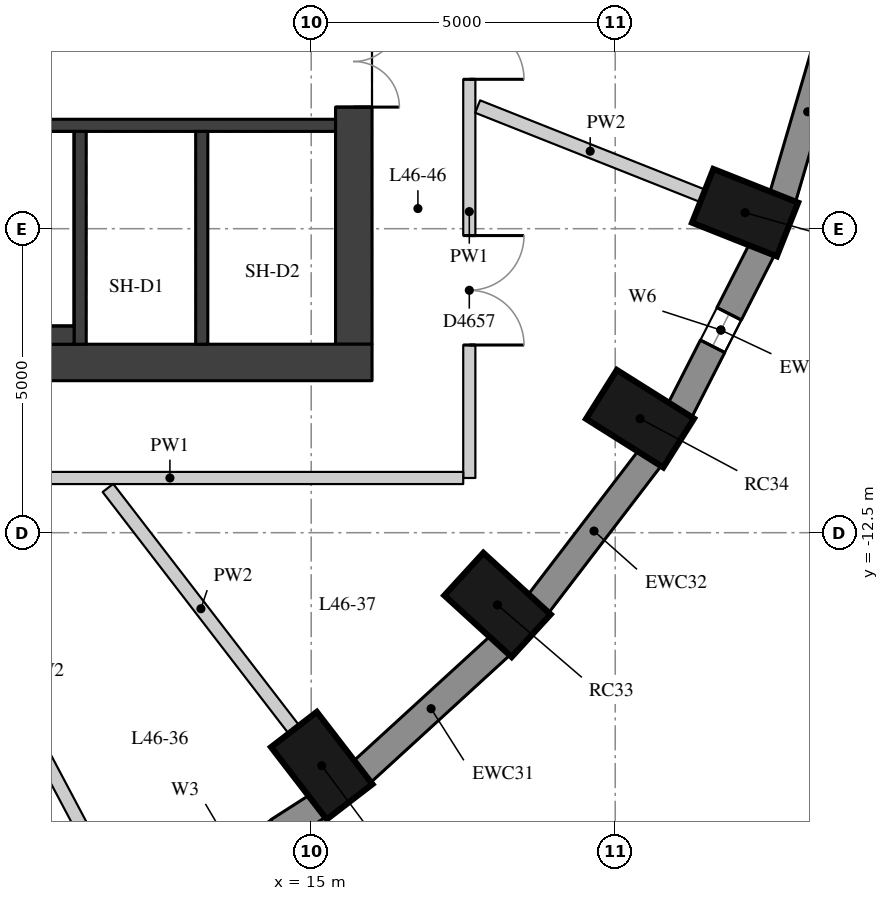
"""IFC4 building model, lengths in metres.
Left out: names, types, materials, properties, quantities, classifications, styles, units other than length and angle.
Written with IfcOpenShell. Run it as: python <this file> out.ifc"""

import sys

from ifc_helpers import new_model, si_unit, direction, frame, frame_2d, origin, origin_2d, place, context, subcontext, project, spatial, rectangle, extrude, element, fill, save


model = new_model("IFC4")
c1 = context("Model", 3, precision=1e-05, world=origin(), true_north=direction((0.0, 1.0)))
c2 = subcontext(c1, "Body", "Model", "MODEL_VIEW")
j1 = project(units=[si_unit("LENGTHUNIT", "METRE"), si_unit("PLANEANGLEUNIT", "RADIAN")], contexts=[c1])
p1 = place(None, origin())
s1 = spatial("IfcSite", under=j1, at=p1, CompositionType="ELEMENT")
p2 = place(p1, origin())
s2 = spatial("IfcBuilding", under=s1, at=p2, CompositionType="ELEMENT")
p3 = place(p2, frame((0.0, 0.0, 164.9)))
s3 = spatial("IfcBuildingStorey", under=s2, at=p3, CompositionType="ELEMENT", Elevation=164.9)
for number, where, z_axis, x_axis in (
    (1, (15.173, -16.332, 0.0), (0.0, 0.0, 1.0), (0.61, -0.792, 0.0)),
    (2, (18.064, -13.688, 0.0), (0.0, 0.0, 1.0), (0.738, -0.675, 0.0)),
    (3, (20.408, -10.625, 0.0), (0.0, 0.0, 1.0), (0.846, -0.533, 0.0)),
    (4, (22.136, -7.236, 0.0), (0.0, 0.0, 1.0), (0.93, -0.369, 0.0)),
):
    element("IfcColumn", number, at=place(p3, frame(where, z_axis=z_axis, x_axis=x_axis)), inside=s3, PredefinedType="COLUMN", context=c2, shape_type="SweptSolid", body=[
        extrude(rectangle(XDim=1.5, YDim=0.95, at=origin_2d()), origin(), (0.0, 0.0, 1.0), 3.3),
    ])
p4 = place(p3, frame((12.455, -18.693, 0.0), z_axis=(0.0, 0.0, 1.0), x_axis=(0.842065914439, 0.539374633943, 0.0)))
e5 = element("IfcWall", 5, at=p4, inside=s3, PredefinedType="SOLIDWALL", context=c2, shape_type="SweptSolid", body=[
    extrude(rectangle(XDim=3.151, YDim=0.45, at=frame_2d((1.576, 0.0))), origin(), (0.0, 0.0, 1.0), 3.02),
])
p5 = place(p4, frame((0.776, 0.0, 0.4)))
e6 = element("IfcOpeningElement", 6, at=p5, cuts=e5, PredefinedType="OPENING", context=c2, shape_type="SweptSolid", body=[
    extrude(rectangle(XDim=1.6, YDim=1.75, at=frame_2d((0.8, 0.875))), frame((0.0, 0.235, 0.0), z_axis=(0.0, -1.0, 0.0), x_axis=(1.0, 0.0, 0.0)), (0.0, 0.0, 1.0), 0.47),
])
p6 = place(p3, frame((15.83, -16.439, 0.0), z_axis=(0.0, 0.0, 1.0), x_axis=(0.737808755941, 0.675009807082, 0.0)))
e7 = element("IfcWall", 7, at=p6, inside=s3, PredefinedType="SOLIDWALL", context=c2, shape_type="SweptSolid", body=[
    extrude(rectangle(XDim=3.094, YDim=0.45, at=frame_2d((1.547, 0.0))), origin(), (0.0, 0.0, 1.0), 3.02),
])
p7 = place(p3, frame((18.728, -13.679, 0.0), z_axis=(0.0, 0.0, 1.0), x_axis=(0.607817056371, 0.794077090706, 0.0)))
e8 = element("IfcWall", 8, at=p7, inside=s3, PredefinedType="SOLIDWALL", context=c2, shape_type="SweptSolid", body=[
    extrude(rectangle(XDim=3.037, YDim=0.45, at=frame_2d((1.519, 0.0))), origin(), (0.0, 0.0, 1.0), 3.02),
])
p8 = place(p3, frame((21.059, -10.497, 0.0), z_axis=(0.0, 0.0, 1.0), x_axis=(0.454133999889, 0.890933392653, 0.0)))
e9 = element("IfcWall", 9, at=p8, inside=s3, PredefinedType="SOLIDWALL", context=c2, shape_type="SweptSolid", body=[
    extrude(rectangle(XDim=2.986, YDim=0.45, at=frame_2d((1.493, 0.0))), origin(), (0.0, 0.0, 1.0), 3.02),
])
p9 = place(p8, frame((1.193, 0.0, 0.4)))
e10 = element("IfcOpeningElement", 10, at=p9, cuts=e9, PredefinedType="OPENING", context=c2, shape_type="SweptSolid", body=[
    extrude(rectangle(XDim=0.6, YDim=1.75, at=frame_2d((0.3, 0.875))), frame((0.0, 0.235, 0.0), z_axis=(0.0, -1.0, 0.0), x_axis=(1.0, 0.0, 0.0)), (0.0, 0.0, 1.0), 0.47),
])
p10 = place(p3, frame((22.751, -6.991, 0.0), z_axis=(0.0, 0.0, 1.0), x_axis=(0.281049481624, 0.959693278542, 0.0)))
e11 = element("IfcWall", 11, at=p10, inside=s3, PredefinedType="SOLIDWALL", context=c2, shape_type="SweptSolid", body=[
    extrude(rectangle(XDim=2.948, YDim=0.45, at=frame_2d((1.474, 0.0))), origin(), (0.0, 0.0, 1.0), 3.02),
])
p11 = place(p3, frame((15.7, -9.4, 0.0), z_axis=(0.0, 0.0, 1.0), x_axis=(0.0, 1.0, 0.0)))
e12 = element("IfcWall", 12, at=p11, inside=s3, PredefinedType="SHEAR", context=c2, shape_type="SweptSolid", body=[
    extrude(rectangle(XDim=18.8, YDim=0.6, at=frame_2d((9.4, 0.0))), origin(), (0.0, 0.0, 1.0), 3.02),
])
p12 = place(p11, frame((13.4, 0.0, 0.0)))
e13 = element("IfcOpeningElement", 13, at=p12, cuts=e12, PredefinedType="OPENING", context=c2, shape_type="SweptSolid", body=[
    extrude(rectangle(XDim=1.5, YDim=2.1, at=frame_2d((0.75, 1.05))), frame((0.0, 0.31, 0.0), z_axis=(0.0, -1.0, 0.0), x_axis=(1.0, 0.0, 0.0)), (0.0, 0.0, 1.0), 0.62),
])
p13 = place(p11, frame((3.9, 0.0, 0.0)))
e14 = element("IfcOpeningElement", 14, at=p13, cuts=e12, PredefinedType="OPENING", context=c2, shape_type="SweptSolid", body=[
    extrude(rectangle(XDim=1.5, YDim=2.1, at=frame_2d((0.75, 1.05))), frame((0.0, 0.31, 0.0), z_axis=(0.0, -1.0, 0.0), x_axis=(1.0, 0.0, 0.0)), (0.0, 0.0, 1.0), 0.62),
])
p14 = place(p3, frame((4.0, -9.7, 0.0), z_axis=(0.0, 0.0, 1.0), x_axis=(1.0, 0.0, 0.0)))
e15 = element("IfcWall", 15, at=p14, inside=s3, PredefinedType="SHEAR", context=c2, shape_type="SweptSolid", body=[
    extrude(rectangle(XDim=12.0, YDim=0.6, at=frame_2d((6.0, 0.0))), origin(), (0.0, 0.0, 1.0), 3.02),
])
p15 = place(p3, frame((4.6, -5.8, 0.0), z_axis=(0.0, 0.0, 1.0), x_axis=(1.0, 0.0, 0.0)))
e16 = element("IfcWall", 16, at=p15, inside=s3, PredefinedType="SHEAR", context=c2, shape_type="SweptSolid", body=[
    extrude(rectangle(XDim=10.8, YDim=0.2, at=frame_2d((5.4, 0.0))), origin(), (0.0, 0.0, 1.0), 3.02),
])
for number, where, z_axis, x_axis in (
    (17, (11.2, -9.4, 0.0), (0.0, 0.0, 1.0), (0.0, 1.0, 0.0)),
    (18, (13.2, -9.4, 0.0), (0.0, 0.0, 1.0), (0.0, 1.0, 0.0)),
):
    element("IfcWall", number, at=place(p3, frame(where, z_axis=z_axis, x_axis=x_axis)), inside=s3, PredefinedType="SHEAR", context=c2, shape_type="SweptSolid", body=[
        extrude(rectangle(XDim=3.5, YDim=0.2, at=frame_2d((1.75, 0.0))), origin(), (0.0, 0.0, 1.0), 3.02),
    ])
p16 = place(p3, frame((6.22, -9.25, 0.0), z_axis=(0.0, 0.0, 1.0), x_axis=(1.0, 0.0, 0.0)))
e19 = element("IfcWall", 19, at=p16, inside=s3, PredefinedType="PARTITIONING", context=c2, shape_type="SweptSolid", body=[
    extrude(rectangle(XDim=4.88, YDim=0.3, at=frame_2d((2.44, 0.0))), origin(), (0.0, 0.0, 1.0), 3.02),
])
p17 = place(p3, frame((17.6, -2.838, 0.0), z_axis=(0.0, 0.0, 1.0), x_axis=(0.0, -1.0, 0.0)))
e20 = element("IfcWall", 20, at=p17, inside=s3, PredefinedType="PARTITIONING", context=c2, shape_type="SweptSolid", body=[
    extrude(rectangle(XDim=8.762, YDim=0.2, at=frame_2d((4.381, 0.0))), origin(), (0.0, 0.0, 1.0), 3.02),
])
p18 = place(p17, frame((4.775, 0.0, 0.0)))
e21 = element("IfcOpeningElement", 21, at=p18, cuts=e20, PredefinedType="OPENING", context=c2, shape_type="SweptSolid", body=[
    extrude(rectangle(XDim=1.8, YDim=2.1, at=frame_2d((0.9, 1.05))), frame((0.0, 0.11, 0.0), z_axis=(0.0, -1.0, 0.0), x_axis=(1.0, 0.0, 0.0)), (0.0, 0.0, 1.0), 0.22),
])
p19 = place(p17, frame((0.405, 0.0, 0.0)))
e22 = element("IfcOpeningElement", 22, at=p19, cuts=e20, PredefinedType="OPENING", context=c2, shape_type="SweptSolid", body=[
    extrude(rectangle(XDim=1.8, YDim=2.1, at=frame_2d((0.9, 1.05))), frame((0.0, 0.11, 0.0), z_axis=(0.0, -1.0, 0.0), x_axis=(1.0, 0.0, 0.0)), (0.0, 0.0, 1.0), 0.22),
])
p20 = place(p3, frame((17.5, -11.6, 0.0), z_axis=(0.0, 0.0, 1.0), x_axis=(-1.0, 0.0, 0.0)))
e23 = element("IfcWall", 23, at=p20, inside=s3, PredefinedType="PARTITIONING", context=c2, shape_type="SweptSolid", body=[
    extrude(rectangle(XDim=9.647, YDim=0.2, at=frame_2d((4.823, 0.0))), origin(), (0.0, 0.0, 1.0), 3.02),
])
p21 = place(p20, frame((7.192, 0.0, 0.0)))
e24 = element("IfcOpeningElement", 24, at=p21, cuts=e23, PredefinedType="OPENING", context=c2, shape_type="SweptSolid", body=[
    extrude(rectangle(XDim=0.9, YDim=2.1, at=frame_2d((0.45, 1.05))), frame((0.0, 0.11, 0.0), z_axis=(0.0, -1.0, 0.0), x_axis=(1.0, 0.0, 0.0)), (0.0, 0.0, 1.0), 0.22),
])
p22 = place(p3, frame((11.474, -17.813, 0.0), z_axis=(0.0, 0.0, 1.0), x_axis=(-0.468051273849, 0.88370130986, 0.0)))
e25 = element("IfcWall", 25, at=p22, inside=s3, PredefinedType="PARTITIONING", context=c2, shape_type="SweptSolid", body=[
    extrude(rectangle(XDim=6.858, YDim=0.22, at=frame_2d((3.429, 0.0))), origin(), (0.0, 0.0, 1.0), 3.02),
])
p23 = place(p3, frame((14.716, -15.737, 0.0), z_axis=(0.0, 0.0, 1.0), x_axis=(-0.609986007715, 0.792412184657, 0.0)))
e26 = element("IfcWall", 26, at=p23, inside=s3, PredefinedType="PARTITIONING", context=c2, shape_type="SweptSolid", body=[
    extrude(rectangle(XDim=5.015, YDim=0.22, at=frame_2d((2.507, 0.0))), origin(), (0.0, 0.0, 1.0), 3.02),
])
p24 = place(p3, frame((21.439, -6.96, 0.0), z_axis=(0.0, 0.0, 1.0), x_axis=(-0.929517399972, 0.368778257426, 0.0)))
e27 = element("IfcWall", 27, at=p24, inside=s3, PredefinedType="PARTITIONING", context=c2, shape_type="SweptSolid", body=[
    extrude(rectangle(XDim=3.982, YDim=0.22, at=frame_2d((1.991, 0.0))), origin(), (0.0, 0.0, 1.0), 3.02),
])
p25 = place(p9, origin())
e28 = element("IfcWindow", 28, at=p25, inside=s3, PartitioningType="SINGLE_PANEL", PredefinedType="WINDOW", context=c2, shape_type="SweptSolid", body=[
    extrude(rectangle(XDim=0.6, YDim=1.75, at=frame_2d((0.3, 0.875))), frame((0.0, 0.035, 0.0), z_axis=(0.0, -1.0, 0.0), x_axis=(1.0, 0.0, 0.0)), (0.0, 0.0, 1.0), 0.06),
])
fill(e10, e28)
p26 = place(p13, origin())
e29 = element("IfcDoor", 29, at=p26, inside=s3, OperationType="DOUBLE_DOOR_SINGLE_SWING", PredefinedType="DOOR", context=c2, shape_type="SweptSolid", body=[
    extrude(rectangle(XDim=1.5, YDim=2.1, at=frame_2d((0.75, 1.05))), frame((0.0, 0.025, 0.0), z_axis=(0.0, -1.0, 0.0), x_axis=(1.0, 0.0, 0.0)), (0.0, 0.0, 1.0), 0.05),
])
fill(e14, e29)
p27 = place(p18, origin())
e30 = element("IfcDoor", 30, at=p27, inside=s3, OperationType="DOUBLE_DOOR_SINGLE_SWING", PredefinedType="DOOR", context=c2, shape_type="SweptSolid", body=[
    extrude(rectangle(XDim=1.8, YDim=2.1, at=frame_2d((0.9, 1.05))), frame((0.0, 0.025, 0.0), z_axis=(0.0, -1.0, 0.0), x_axis=(1.0, 0.0, 0.0)), (0.0, 0.0, 1.0), 0.05),
])
fill(e21, e30)
p28 = place(p19, origin())
e31 = element("IfcDoor", 31, at=p28, inside=s3, OperationType="DOUBLE_DOOR_SINGLE_SWING", PredefinedType="DOOR", context=c2, shape_type="SweptSolid", body=[
    extrude(rectangle(XDim=1.8, YDim=2.1, at=frame_2d((0.9, 1.05))), frame((0.0, 0.025, 0.0), z_axis=(0.0, -1.0, 0.0), x_axis=(1.0, 0.0, 0.0)), (0.0, 0.0, 1.0), 0.05),
])
fill(e22, e31)
save(model, sys.argv[1])
